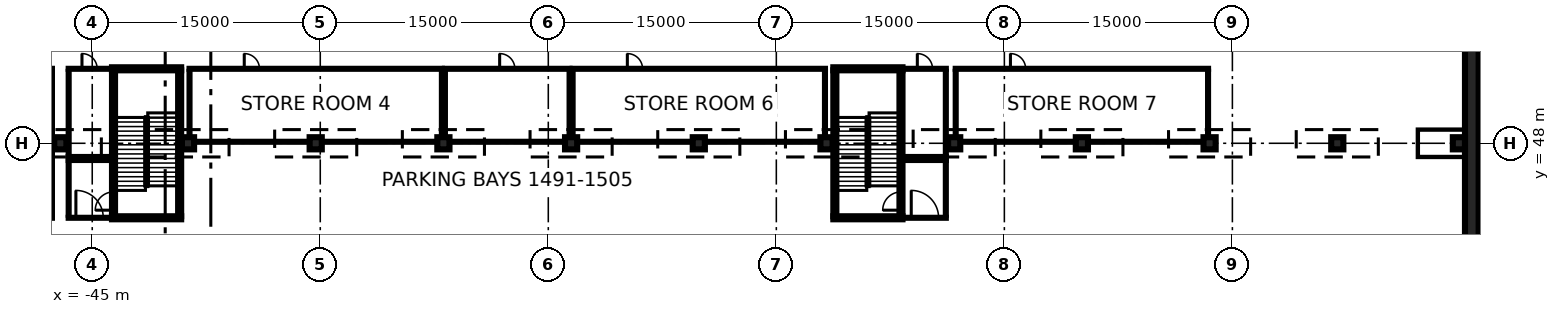
"""IFC4 building model, lengths in metres.
Left out: names, types, materials, properties, quantities, classifications, styles, units other than length and angle.
Written with IfcOpenShell. Run it as: python <this file> out.ifc"""

import sys

from ifc_helpers import new_model, si_unit, direction, frame, frame_2d, origin, origin_2d, place, context, subcontext, project, spatial, rectangle, extrude, element, fill, save


model = new_model("IFC4")
c1 = context("Model", 3, precision=1e-05, world=origin(), true_north=direction((0.0, 1.0)))
c2 = subcontext(c1, "Body", "Model", "MODEL_VIEW")
j1 = project(units=[si_unit("LENGTHUNIT", "METRE"), si_unit("PLANEANGLEUNIT", "RADIAN")], contexts=[c1])
p1 = place(None, origin())
s1 = spatial("IfcSite", under=j1, at=p1, CompositionType="ELEMENT")
p2 = place(p1, origin())
s2 = spatial("IfcBuilding", under=s1, at=p2, CompositionType="ELEMENT")
p3 = place(p2, frame((0.0, 0.0, -12.0)))
s3 = spatial("IfcBuildingStorey", under=s2, at=p3, CompositionType="ELEMENT", Elevation=-12.0)
p4 = place(p3, frame((45.75, -80.0, 0.0), z_axis=(0.0, 0.0, 1.0), x_axis=(0.0, 1.0, 0.0)))
e1 = element("IfcWall", 1, at=p4, inside=s3, PredefinedType="USERDEFINED", context=c2, shape_type="SweptSolid", body=[
    extrude(rectangle(XDim=160.0, YDim=0.9, at=frame_2d((80.0, 0.0))), origin(), (0.0, 0.0, 1.0), 11.55),
])
for number, where, z_axis, x_axis in (
    (2, (-47.1, 48.0, 0.0), (0.0, 0.0, 1.0), (1.0, 0.0, 0.0)),
    (3, (-38.7, 48.0, 0.0), (0.0, 0.0, 1.0), (1.0, 0.0, 0.0)),
    (4, (-30.3, 48.0, 0.0), (0.0, 0.0, 1.0), (1.0, 0.0, 0.0)),
    (5, (-21.9, 48.0, 0.0), (0.0, 0.0, 1.0), (1.0, 0.0, 0.0)),
    (6, (-13.5, 48.0, 0.0), (0.0, 0.0, 1.0), (1.0, 0.0, 0.0)),
    (7, (-5.1, 48.0, 0.0), (0.0, 0.0, 1.0), (1.0, 0.0, 0.0)),
    (8, (3.3, 48.0, 0.0), (0.0, 0.0, 1.0), (1.0, 0.0, 0.0)),
    (9, (11.7, 48.0, 0.0), (0.0, 0.0, 1.0), (1.0, 0.0, 0.0)),
    (10, (20.1, 48.0, 0.0), (0.0, 0.0, 1.0), (1.0, 0.0, 0.0)),
    (11, (28.5, 48.0, 0.0), (0.0, 0.0, 1.0), (1.0, 0.0, 0.0)),
    (12, (36.9, 48.0, 0.0), (0.0, 0.0, 1.0), (1.0, 0.0, 0.0)),
    (13, (44.9, 48.0, 0.0), (0.0, 0.0, 1.0), (1.0, 0.0, 0.0)),
):
    element("IfcColumn", number, at=place(p3, frame(where, z_axis=z_axis, x_axis=x_axis)), inside=s3, PredefinedType="COLUMN", context=c2, shape_type="SweptSolid", body=[
        extrude(rectangle(XDim=0.8, YDim=0.8, at=origin_2d()), origin(), (0.0, 0.0, 1.0), 4.4),
    ])
p5 = place(p3, frame((-38.7, 48.1, 0.0), z_axis=(0.0, 0.0, 1.0), x_axis=(1.0, 0.0, 0.0)))
e14 = element("IfcWall", 14, at=p5, inside=s3, PredefinedType="PARTITIONING", context=c2, shape_type="SweptSolid", body=[
    extrude(rectangle(XDim=16.8, YDim=0.2, at=frame_2d((8.4, 0.0))), origin(), (0.0, 0.0, 1.0), 4.4),
])
p6 = place(p3, frame((-38.7, 52.9, 0.0), z_axis=(0.0, 0.0, 1.0), x_axis=(1.0, 0.0, 0.0)))
e15 = element("IfcWall", 15, at=p6, inside=s3, PredefinedType="PARTITIONING", context=c2, shape_type="SweptSolid", body=[
    extrude(rectangle(XDim=16.8, YDim=0.2, at=frame_2d((8.4, 0.0))), origin(), (0.0, 0.0, 1.0), 4.4),
])
p7 = place(p6, frame((3.7, 0.0, 0.0)))
e16 = element("IfcOpeningElement", 16, at=p7, cuts=e15, PredefinedType="OPENING", context=c2, shape_type="SweptSolid", body=[
    extrude(rectangle(XDim=1.0, YDim=2.1, at=frame_2d((0.5, 1.05))), frame((0.0, 0.11, 0.0), z_axis=(0.0, -1.0, 0.0), x_axis=(1.0, 0.0, 0.0)), (0.0, 0.0, 1.0), 0.22),
])
for number, where, z_axis, x_axis in (
    (17, (-38.6, 48.4, 0.0), (0.0, 0.0, 1.0), (0.0, 1.0, 0.0)),
    (18, (-22.0, 48.4, 0.0), (0.0, 0.0, 1.0), (0.0, 1.0, 0.0)),
):
    element("IfcWall", number, at=place(p3, frame(where, z_axis=z_axis, x_axis=x_axis)), inside=s3, PredefinedType="PARTITIONING", context=c2, shape_type="SweptSolid", body=[
        extrude(rectangle(XDim=4.4, YDim=0.2, at=frame_2d((2.2, 0.0))), origin(), (0.0, 0.0, 1.0), 4.4),
    ])
p8 = place(p3, frame((-21.9, 48.1, 0.0), z_axis=(0.0, 0.0, 1.0), x_axis=(1.0, 0.0, 0.0)))
e19 = element("IfcWall", 19, at=p8, inside=s3, PredefinedType="PARTITIONING", context=c2, shape_type="SweptSolid", body=[
    extrude(rectangle(XDim=8.4, YDim=0.2, at=frame_2d((4.2, 0.0))), origin(), (0.0, 0.0, 1.0), 4.4),
])
p9 = place(p3, frame((-21.9, 52.9, 0.0), z_axis=(0.0, 0.0, 1.0), x_axis=(1.0, 0.0, 0.0)))
e20 = element("IfcWall", 20, at=p9, inside=s3, PredefinedType="PARTITIONING", context=c2, shape_type="SweptSolid", body=[
    extrude(rectangle(XDim=8.4, YDim=0.2, at=frame_2d((4.2, 0.0))), origin(), (0.0, 0.0, 1.0), 4.4),
])
p10 = place(p9, frame((3.7, 0.0, 0.0)))
e21 = element("IfcOpeningElement", 21, at=p10, cuts=e20, PredefinedType="OPENING", context=c2, shape_type="SweptSolid", body=[
    extrude(rectangle(XDim=1.0, YDim=2.1, at=frame_2d((0.5, 1.05))), frame((0.0, 0.11, 0.0), z_axis=(0.0, -1.0, 0.0), x_axis=(1.0, 0.0, 0.0)), (0.0, 0.0, 1.0), 0.22),
])
for number, where, z_axis, x_axis in (
    (22, (-21.8, 48.4, 0.0), (0.0, 0.0, 1.0), (0.0, 1.0, 0.0)),
    (23, (-13.6, 48.4, 0.0), (0.0, 0.0, 1.0), (0.0, 1.0, 0.0)),
):
    element("IfcWall", number, at=place(p3, frame(where, z_axis=z_axis, x_axis=x_axis)), inside=s3, PredefinedType="PARTITIONING", context=c2, shape_type="SweptSolid", body=[
        extrude(rectangle(XDim=4.4, YDim=0.2, at=frame_2d((2.2, 0.0))), origin(), (0.0, 0.0, 1.0), 4.4),
    ])
p11 = place(p3, frame((-13.5, 48.1, 0.0), z_axis=(0.0, 0.0, 1.0), x_axis=(1.0, 0.0, 0.0)))
e24 = element("IfcWall", 24, at=p11, inside=s3, PredefinedType="PARTITIONING", context=c2, shape_type="SweptSolid", body=[
    extrude(rectangle(XDim=16.8, YDim=0.2, at=frame_2d((8.4, 0.0))), origin(), (0.0, 0.0, 1.0), 4.4),
])
p12 = place(p3, frame((-13.5, 52.9, 0.0), z_axis=(0.0, 0.0, 1.0), x_axis=(1.0, 0.0, 0.0)))
e25 = element("IfcWall", 25, at=p12, inside=s3, PredefinedType="PARTITIONING", context=c2, shape_type="SweptSolid", body=[
    extrude(rectangle(XDim=16.8, YDim=0.2, at=frame_2d((8.4, 0.0))), origin(), (0.0, 0.0, 1.0), 4.4),
])
p13 = place(p12, frame((3.7, 0.0, 0.0)))
e26 = element("IfcOpeningElement", 26, at=p13, cuts=e25, PredefinedType="OPENING", context=c2, shape_type="SweptSolid", body=[
    extrude(rectangle(XDim=1.0, YDim=2.1, at=frame_2d((0.5, 1.05))), frame((0.0, 0.11, 0.0), z_axis=(0.0, -1.0, 0.0), x_axis=(1.0, 0.0, 0.0)), (0.0, 0.0, 1.0), 0.22),
])
for number, where, z_axis, x_axis in (
    (27, (-13.4, 48.4, 0.0), (0.0, 0.0, 1.0), (0.0, 1.0, 0.0)),
    (28, (3.2, 48.4, 0.0), (0.0, 0.0, 1.0), (0.0, 1.0, 0.0)),
):
    element("IfcWall", number, at=place(p3, frame(where, z_axis=z_axis, x_axis=x_axis)), inside=s3, PredefinedType="PARTITIONING", context=c2, shape_type="SweptSolid", body=[
        extrude(rectangle(XDim=4.4, YDim=0.2, at=frame_2d((2.2, 0.0))), origin(), (0.0, 0.0, 1.0), 4.4),
    ])
p14 = place(p3, frame((11.7, 48.1, 0.0), z_axis=(0.0, 0.0, 1.0), x_axis=(1.0, 0.0, 0.0)))
e29 = element("IfcWall", 29, at=p14, inside=s3, PredefinedType="PARTITIONING", context=c2, shape_type="SweptSolid", body=[
    extrude(rectangle(XDim=16.8, YDim=0.2, at=frame_2d((8.4, 0.0))), origin(), (0.0, 0.0, 1.0), 4.4),
])
p15 = place(p3, frame((11.7, 52.9, 0.0), z_axis=(0.0, 0.0, 1.0), x_axis=(1.0, 0.0, 0.0)))
e30 = element("IfcWall", 30, at=p15, inside=s3, PredefinedType="PARTITIONING", context=c2, shape_type="SweptSolid", body=[
    extrude(rectangle(XDim=16.8, YDim=0.2, at=frame_2d((8.4, 0.0))), origin(), (0.0, 0.0, 1.0), 4.4),
])
p16 = place(p15, frame((3.7, 0.0, 0.0)))
e31 = element("IfcOpeningElement", 31, at=p16, cuts=e30, PredefinedType="OPENING", context=c2, shape_type="SweptSolid", body=[
    extrude(rectangle(XDim=1.0, YDim=2.1, at=frame_2d((0.5, 1.05))), frame((0.0, 0.11, 0.0), z_axis=(0.0, -1.0, 0.0), x_axis=(1.0, 0.0, 0.0)), (0.0, 0.0, 1.0), 0.22),
])
for number, where, z_axis, x_axis in (
    (32, (11.8, 48.4, 0.0), (0.0, 0.0, 1.0), (0.0, 1.0, 0.0)),
    (33, (28.4, 48.4, 0.0), (0.0, 0.0, 1.0), (0.0, 1.0, 0.0)),
):
    element("IfcWall", number, at=place(p3, frame(where, z_axis=z_axis, x_axis=x_axis)), inside=s3, PredefinedType="PARTITIONING", context=c2, shape_type="SweptSolid", body=[
        extrude(rectangle(XDim=4.4, YDim=0.2, at=frame_2d((2.2, 0.0))), origin(), (0.0, 0.0, 1.0), 4.4),
    ])
p17 = place(p3, frame((-50.5, 43.1, 0.0), z_axis=(0.0, 0.0, 1.0), x_axis=(1.0, 0.0, 0.0)))
e34 = element("IfcWall", 34, at=p17, inside=s3, PredefinedType="PARTITIONING", context=c2, shape_type="SweptSolid", body=[
    extrude(rectangle(XDim=2.95, YDim=0.2, at=frame_2d((1.475, 0.0))), origin(), (0.0, 0.0, 1.0), 4.4),
])
p18 = place(p17, frame((0.575, 0.0, 0.0)))
e35 = element("IfcOpeningElement", 35, at=p18, cuts=e34, PredefinedType="OPENING", context=c2, shape_type="SweptSolid", body=[
    extrude(rectangle(XDim=1.8, YDim=2.1, at=frame_2d((0.9, 1.05))), frame((0.0, 0.11, 0.0), z_axis=(0.0, -1.0, 0.0), x_axis=(1.0, 0.0, 0.0)), (0.0, 0.0, 1.0), 0.22),
])
p19 = place(p3, frame((-50.5, 46.9, 0.0), z_axis=(0.0, 0.0, 1.0), x_axis=(1.0, 0.0, 0.0)))
e36 = element("IfcWall", 36, at=p19, inside=s3, PredefinedType="PARTITIONING", context=c2, shape_type="SweptSolid", body=[
    extrude(rectangle(XDim=2.95, YDim=0.2, at=frame_2d((1.475, 0.0))), origin(), (0.0, 0.0, 1.0), 4.4),
])
p20 = place(p3, frame((-47.65, 43.2, 0.0), z_axis=(0.0, 0.0, 1.0), x_axis=(0.0, 1.0, 0.0)))
e37 = element("IfcWall", 37, at=p20, inside=s3, PredefinedType="PARTITIONING", context=c2, shape_type="SweptSolid", body=[
    extrude(rectangle(XDim=3.6, YDim=0.2, at=frame_2d((1.8, 0.0))), origin(), (0.0, 0.0, 1.0), 4.4),
])
p21 = place(p3, frame((-50.5, 47.1, 0.0), z_axis=(0.0, 0.0, 1.0), x_axis=(1.0, 0.0, 0.0)))
e38 = element("IfcWall", 38, at=p21, inside=s3, PredefinedType="PARTITIONING", context=c2, shape_type="SweptSolid", body=[
    extrude(rectangle(XDim=2.95, YDim=0.2, at=frame_2d((1.475, 0.0))), origin(), (0.0, 0.0, 1.0), 4.4),
])
p22 = place(p3, frame((-50.5, 52.9, 0.0), z_axis=(0.0, 0.0, 1.0), x_axis=(1.0, 0.0, 0.0)))
e39 = element("IfcWall", 39, at=p22, inside=s3, PredefinedType="PARTITIONING", context=c2, shape_type="SweptSolid", body=[
    extrude(rectangle(XDim=2.95, YDim=0.2, at=frame_2d((1.475, 0.0))), origin(), (0.0, 0.0, 1.0), 4.4),
])
p23 = place(p22, frame((0.975, 0.0, 0.0)))
e40 = element("IfcOpeningElement", 40, at=p23, cuts=e39, PredefinedType="OPENING", context=c2, shape_type="SweptSolid", body=[
    extrude(rectangle(XDim=1.0, YDim=2.1, at=frame_2d((0.5, 1.05))), frame((0.0, 0.11, 0.0), z_axis=(0.0, -1.0, 0.0), x_axis=(1.0, 0.0, 0.0)), (0.0, 0.0, 1.0), 0.22),
])
p24 = place(p3, frame((-47.65, 47.2, 0.0), z_axis=(0.0, 0.0, 1.0), x_axis=(0.0, 1.0, 0.0)))
e41 = element("IfcWall", 41, at=p24, inside=s3, PredefinedType="PARTITIONING", context=c2, shape_type="SweptSolid", body=[
    extrude(rectangle(XDim=5.6, YDim=0.2, at=frame_2d((2.8, 0.0))), origin(), (0.0, 0.0, 1.0), 4.4),
])
p25 = place(p3, frame((8.3, 43.1, 0.0), z_axis=(0.0, 0.0, 1.0), x_axis=(1.0, 0.0, 0.0)))
e42 = element("IfcWall", 42, at=p25, inside=s3, PredefinedType="PARTITIONING", context=c2, shape_type="SweptSolid", body=[
    extrude(rectangle(XDim=2.95, YDim=0.2, at=frame_2d((1.475, 0.0))), origin(), (0.0, 0.0, 1.0), 4.4),
])
p26 = place(p25, frame((0.575, 0.0, 0.0)))
e43 = element("IfcOpeningElement", 43, at=p26, cuts=e42, PredefinedType="OPENING", context=c2, shape_type="SweptSolid", body=[
    extrude(rectangle(XDim=1.8, YDim=2.1, at=frame_2d((0.9, 1.05))), frame((0.0, 0.11, 0.0), z_axis=(0.0, -1.0, 0.0), x_axis=(1.0, 0.0, 0.0)), (0.0, 0.0, 1.0), 0.22),
])
p27 = place(p3, frame((8.3, 46.9, 0.0), z_axis=(0.0, 0.0, 1.0), x_axis=(1.0, 0.0, 0.0)))
e44 = element("IfcWall", 44, at=p27, inside=s3, PredefinedType="PARTITIONING", context=c2, shape_type="SweptSolid", body=[
    extrude(rectangle(XDim=2.95, YDim=0.2, at=frame_2d((1.475, 0.0))), origin(), (0.0, 0.0, 1.0), 4.4),
])
p28 = place(p3, frame((11.15, 43.2, 0.0), z_axis=(0.0, 0.0, 1.0), x_axis=(0.0, 1.0, 0.0)))
e45 = element("IfcWall", 45, at=p28, inside=s3, PredefinedType="PARTITIONING", context=c2, shape_type="SweptSolid", body=[
    extrude(rectangle(XDim=3.6, YDim=0.2, at=frame_2d((1.8, 0.0))), origin(), (0.0, 0.0, 1.0), 4.4),
])
p29 = place(p3, frame((8.3, 47.1, 0.0), z_axis=(0.0, 0.0, 1.0), x_axis=(1.0, 0.0, 0.0)))
e46 = element("IfcWall", 46, at=p29, inside=s3, PredefinedType="PARTITIONING", context=c2, shape_type="SweptSolid", body=[
    extrude(rectangle(XDim=2.95, YDim=0.2, at=frame_2d((1.475, 0.0))), origin(), (0.0, 0.0, 1.0), 4.4),
])
p30 = place(p3, frame((8.3, 52.9, 0.0), z_axis=(0.0, 0.0, 1.0), x_axis=(1.0, 0.0, 0.0)))
e47 = element("IfcWall", 47, at=p30, inside=s3, PredefinedType="PARTITIONING", context=c2, shape_type="SweptSolid", body=[
    extrude(rectangle(XDim=2.95, YDim=0.2, at=frame_2d((1.475, 0.0))), origin(), (0.0, 0.0, 1.0), 4.4),
])
p31 = place(p30, frame((0.975, 0.0, 0.0)))
e48 = element("IfcOpeningElement", 48, at=p31, cuts=e47, PredefinedType="OPENING", context=c2, shape_type="SweptSolid", body=[
    extrude(rectangle(XDim=1.0, YDim=2.1, at=frame_2d((0.5, 1.05))), frame((0.0, 0.11, 0.0), z_axis=(0.0, -1.0, 0.0), x_axis=(1.0, 0.0, 0.0)), (0.0, 0.0, 1.0), 0.22),
])
p32 = place(p3, frame((11.15, 47.2, 0.0), z_axis=(0.0, 0.0, 1.0), x_axis=(0.0, 1.0, 0.0)))
e49 = element("IfcWall", 49, at=p32, inside=s3, PredefinedType="PARTITIONING", context=c2, shape_type="SweptSolid", body=[
    extrude(rectangle(XDim=5.6, YDim=0.2, at=frame_2d((2.8, 0.0))), origin(), (0.0, 0.0, 1.0), 4.4),
])
p33 = place(p3, frame((-46.65, 43.1, 0.0), z_axis=(0.0, 0.0, 1.0), x_axis=(1.0, 0.0, 0.0)))
e50 = element("IfcWall", 50, at=p33, inside=s3, PredefinedType="PARTITIONING", context=c2, shape_type="SweptSolid", body=[
    extrude(rectangle(XDim=2.95, YDim=0.2, at=frame_2d((1.475, 0.0))), origin(), (0.0, 0.0, 1.0), 4.4),
])
p34 = place(p33, frame((0.575, 0.0, 0.0)))
e51 = element("IfcOpeningElement", 51, at=p34, cuts=e50, PredefinedType="OPENING", context=c2, shape_type="SweptSolid", body=[
    extrude(rectangle(XDim=1.8, YDim=2.1, at=frame_2d((0.9, 1.05))), frame((0.0, 0.11, 0.0), z_axis=(0.0, -1.0, 0.0), x_axis=(1.0, 0.0, 0.0)), (0.0, 0.0, 1.0), 0.22),
])
p35 = place(p3, frame((-46.65, 46.9, 0.0), z_axis=(0.0, 0.0, 1.0), x_axis=(1.0, 0.0, 0.0)))
e52 = element("IfcWall", 52, at=p35, inside=s3, PredefinedType="PARTITIONING", context=c2, shape_type="SweptSolid", body=[
    extrude(rectangle(XDim=2.95, YDim=0.2, at=frame_2d((1.475, 0.0))), origin(), (0.0, 0.0, 1.0), 4.4),
])
p36 = place(p3, frame((-46.55, 43.2, 0.0), z_axis=(0.0, 0.0, 1.0), x_axis=(0.0, 1.0, 0.0)))
e53 = element("IfcWall", 53, at=p36, inside=s3, PredefinedType="PARTITIONING", context=c2, shape_type="SweptSolid", body=[
    extrude(rectangle(XDim=3.6, YDim=0.2, at=frame_2d((1.8, 0.0))), origin(), (0.0, 0.0, 1.0), 4.4),
])
p37 = place(p3, frame((-46.65, 47.1, 0.0), z_axis=(0.0, 0.0, 1.0), x_axis=(1.0, 0.0, 0.0)))
e54 = element("IfcWall", 54, at=p37, inside=s3, PredefinedType="PARTITIONING", context=c2, shape_type="SweptSolid", body=[
    extrude(rectangle(XDim=2.95, YDim=0.2, at=frame_2d((1.475, 0.0))), origin(), (0.0, 0.0, 1.0), 4.4),
])
p38 = place(p3, frame((-46.65, 52.9, 0.0), z_axis=(0.0, 0.0, 1.0), x_axis=(1.0, 0.0, 0.0)))
e55 = element("IfcWall", 55, at=p38, inside=s3, PredefinedType="PARTITIONING", context=c2, shape_type="SweptSolid", body=[
    extrude(rectangle(XDim=2.95, YDim=0.2, at=frame_2d((1.475, 0.0))), origin(), (0.0, 0.0, 1.0), 4.4),
])
p39 = place(p38, frame((0.975, 0.0, 0.0)))
e56 = element("IfcOpeningElement", 56, at=p39, cuts=e55, PredefinedType="OPENING", context=c2, shape_type="SweptSolid", body=[
    extrude(rectangle(XDim=1.0, YDim=2.1, at=frame_2d((0.5, 1.05))), frame((0.0, 0.11, 0.0), z_axis=(0.0, -1.0, 0.0), x_axis=(1.0, 0.0, 0.0)), (0.0, 0.0, 1.0), 0.22),
])
p40 = place(p3, frame((-46.55, 47.2, 0.0), z_axis=(0.0, 0.0, 1.0), x_axis=(0.0, 1.0, 0.0)))
e57 = element("IfcWall", 57, at=p40, inside=s3, PredefinedType="PARTITIONING", context=c2, shape_type="SweptSolid", body=[
    extrude(rectangle(XDim=5.6, YDim=0.2, at=frame_2d((2.8, 0.0))), origin(), (0.0, 0.0, 1.0), 4.4),
])
p41 = place(p3, frame((3.85, 43.2, 0.0), z_axis=(0.0, 0.0, 1.0), x_axis=(0.0, 1.0, 0.0)))
e58 = element("IfcWall", 58, at=p41, inside=s3, PredefinedType="SOLIDWALL", context=c2, shape_type="SweptSolid", body=[
    extrude(rectangle(XDim=9.6, YDim=0.2, at=frame_2d((4.8, 0.0))), origin(), (0.0, 0.0, 1.0), 4.4),
])
p42 = place(p3, frame((8.2, 43.2, 0.0), z_axis=(0.0, 0.0, 1.0), x_axis=(0.0, 1.0, 0.0)))
e59 = element("IfcWall", 59, at=p42, inside=s3, PredefinedType="SOLIDWALL", context=c2, shape_type="SweptSolid", body=[
    extrude(rectangle(XDim=9.6, YDim=0.2, at=frame_2d((4.8, 0.0))), origin(), (0.0, 0.0, 1.0), 4.4),
])
p43 = place(p42, frame((0.4, 0.0, 0.0)))
e60 = element("IfcOpeningElement", 60, at=p43, cuts=e59, PredefinedType="OPENING", context=c2, shape_type="SweptSolid", body=[
    extrude(rectangle(XDim=1.2, YDim=2.1, at=frame_2d((0.6, 1.05))), frame((0.0, 0.11, 0.0), z_axis=(0.0, -1.0, 0.0), x_axis=(1.0, 0.0, 0.0)), (0.0, 0.0, 1.0), 0.22),
])
for number, where, z_axis, x_axis in (
    (61, (8.3, 43.1, 0.0), (0.0, 0.0, 1.0), (-1.0, 0.0, 0.0)),
    (62, (3.75, 52.9, 0.0), (0.0, 0.0, 1.0), (1.0, 0.0, 0.0)),
):
    element("IfcWall", number, at=place(p3, frame(where, z_axis=z_axis, x_axis=x_axis)), inside=s3, PredefinedType="SOLIDWALL", context=c2, shape_type="SweptSolid", body=[
        extrude(rectangle(XDim=4.55, YDim=0.2, at=frame_2d((2.275, 0.0))), origin(), (0.0, 0.0, 1.0), 4.4),
    ])
p44 = place(p3, frame((-43.6, 43.2, 0.0), z_axis=(0.0, 0.0, 1.0), x_axis=(0.0, 1.0, 0.0)))
e63 = element("IfcWall", 63, at=p44, inside=s3, PredefinedType="SOLIDWALL", context=c2, shape_type="SweptSolid", body=[
    extrude(rectangle(XDim=9.6, YDim=0.2, at=frame_2d((4.8, 0.0))), origin(), (0.0, 0.0, 1.0), 4.4),
])
p45 = place(p44, frame((0.4, 0.0, 0.0)))
e64 = element("IfcOpeningElement", 64, at=p45, cuts=e63, PredefinedType="OPENING", context=c2, shape_type="SweptSolid", body=[
    extrude(rectangle(XDim=1.2, YDim=2.1, at=frame_2d((0.6, 1.05))), frame((0.0, 0.11, 0.0), z_axis=(0.0, -1.0, 0.0), x_axis=(1.0, 0.0, 0.0)), (0.0, 0.0, 1.0), 0.22),
])
p46 = place(p3, frame((-39.25, 43.2, 0.0), z_axis=(0.0, 0.0, 1.0), x_axis=(0.0, 1.0, 0.0)))
e65 = element("IfcWall", 65, at=p46, inside=s3, PredefinedType="SOLIDWALL", context=c2, shape_type="SweptSolid", body=[
    extrude(rectangle(XDim=9.6, YDim=0.2, at=frame_2d((4.8, 0.0))), origin(), (0.0, 0.0, 1.0), 4.4),
])
for number, where, z_axis, x_axis in (
    (66, (-39.15, 43.1, 0.0), (0.0, 0.0, 1.0), (-1.0, 0.0, 0.0)),
    (67, (-43.7, 52.9, 0.0), (0.0, 0.0, 1.0), (1.0, 0.0, 0.0)),
):
    element("IfcWall", number, at=place(p3, frame(where, z_axis=z_axis, x_axis=x_axis)), inside=s3, PredefinedType="SOLIDWALL", context=c2, shape_type="SweptSolid", body=[
        extrude(rectangle(XDim=4.55, YDim=0.2, at=frame_2d((2.275, 0.0))), origin(), (0.0, 0.0, 1.0), 4.4),
    ])
p47 = place(p7, origin())
e68 = element("IfcDoor", 68, at=p47, inside=s3, OperationType="SINGLE_SWING_LEFT", PredefinedType="DOOR", context=c2, shape_type="SweptSolid", body=[
    extrude(rectangle(XDim=1.0, YDim=2.1, at=frame_2d((0.5, 1.05))), frame((0.0, 0.025, 0.0), z_axis=(0.0, -1.0, 0.0), x_axis=(1.0, 0.0, 0.0)), (0.0, 0.0, 1.0), 0.05),
])
fill(e16, e68)
p48 = place(p10, origin())
e69 = element("IfcDoor", 69, at=p48, inside=s3, OperationType="SINGLE_SWING_LEFT", PredefinedType="DOOR", context=c2, shape_type="SweptSolid", body=[
    extrude(rectangle(XDim=1.0, YDim=2.1, at=frame_2d((0.5, 1.05))), frame((0.0, 0.025, 0.0), z_axis=(0.0, -1.0, 0.0), x_axis=(1.0, 0.0, 0.0)), (0.0, 0.0, 1.0), 0.05),
])
fill(e21, e69)
p49 = place(p13, origin())
e70 = element("IfcDoor", 70, at=p49, inside=s3, OperationType="SINGLE_SWING_LEFT", PredefinedType="DOOR", context=c2, shape_type="SweptSolid", body=[
    extrude(rectangle(XDim=1.0, YDim=2.1, at=frame_2d((0.5, 1.05))), frame((0.0, 0.025, 0.0), z_axis=(0.0, -1.0, 0.0), x_axis=(1.0, 0.0, 0.0)), (0.0, 0.0, 1.0), 0.05),
])
fill(e26, e70)
p50 = place(p16, origin())
e71 = element("IfcDoor", 71, at=p50, inside=s3, OperationType="SINGLE_SWING_LEFT", PredefinedType="DOOR", context=c2, shape_type="SweptSolid", body=[
    extrude(rectangle(XDim=1.0, YDim=2.1, at=frame_2d((0.5, 1.05))), frame((0.0, 0.025, 0.0), z_axis=(0.0, -1.0, 0.0), x_axis=(1.0, 0.0, 0.0)), (0.0, 0.0, 1.0), 0.05),
])
fill(e31, e71)
p51 = place(p26, origin())
e72 = element("IfcDoor", 72, at=p51, inside=s3, OperationType="DOUBLE_DOOR_SINGLE_SWING", PredefinedType="DOOR", context=c2, shape_type="SweptSolid", body=[
    extrude(rectangle(XDim=1.8, YDim=2.1, at=frame_2d((0.9, 1.05))), frame((0.0, 0.025, 0.0), z_axis=(0.0, -1.0, 0.0), x_axis=(1.0, 0.0, 0.0)), (0.0, 0.0, 1.0), 0.05),
])
fill(e43, e72)
p52 = place(p31, origin())
e73 = element("IfcDoor", 73, at=p52, inside=s3, OperationType="SINGLE_SWING_LEFT", PredefinedType="DOOR", context=c2, shape_type="SweptSolid", body=[
    extrude(rectangle(XDim=1.0, YDim=2.1, at=frame_2d((0.5, 1.05))), frame((0.0, 0.025, 0.0), z_axis=(0.0, -1.0, 0.0), x_axis=(1.0, 0.0, 0.0)), (0.0, 0.0, 1.0), 0.05),
])
fill(e48, e73)
p53 = place(p34, origin())
e74 = element("IfcDoor", 74, at=p53, inside=s3, OperationType="DOUBLE_DOOR_SINGLE_SWING", PredefinedType="DOOR", context=c2, shape_type="SweptSolid", body=[
    extrude(rectangle(XDim=1.8, YDim=2.1, at=frame_2d((0.9, 1.05))), frame((0.0, 0.025, 0.0), z_axis=(0.0, -1.0, 0.0), x_axis=(1.0, 0.0, 0.0)), (0.0, 0.0, 1.0), 0.05),
])
fill(e51, e74)
p54 = place(p39, origin())
e75 = element("IfcDoor", 75, at=p54, inside=s3, OperationType="SINGLE_SWING_LEFT", PredefinedType="DOOR", context=c2, shape_type="SweptSolid", body=[
    extrude(rectangle(XDim=1.0, YDim=2.1, at=frame_2d((0.5, 1.05))), frame((0.0, 0.025, 0.0), z_axis=(0.0, -1.0, 0.0), x_axis=(1.0, 0.0, 0.0)), (0.0, 0.0, 1.0), 0.05),
])
fill(e56, e75)
p55 = place(p43, origin())
e76 = element("IfcDoor", 76, at=p55, inside=s3, OperationType="SINGLE_SWING_LEFT", PredefinedType="DOOR", context=c2, shape_type="SweptSolid", body=[
    extrude(rectangle(XDim=1.2, YDim=2.1, at=frame_2d((0.6, 1.05))), frame((0.0, 0.025, 0.0), z_axis=(0.0, -1.0, 0.0), x_axis=(1.0, 0.0, 0.0)), (0.0, 0.0, 1.0), 0.05),
])
fill(e60, e76)
p56 = place(p45, origin())
e77 = element("IfcDoor", 77, at=p56, inside=s3, OperationType="SINGLE_SWING_LEFT", PredefinedType="DOOR", context=c2, shape_type="SweptSolid", body=[
    extrude(rectangle(XDim=1.2, YDim=2.1, at=frame_2d((0.6, 1.05))), frame((0.0, 0.025, 0.0), z_axis=(0.0, -1.0, 0.0), x_axis=(1.0, 0.0, 0.0)), (0.0, 0.0, 1.0), 0.05),
])
fill(e64, e77)
save(model, sys.argv[1])
